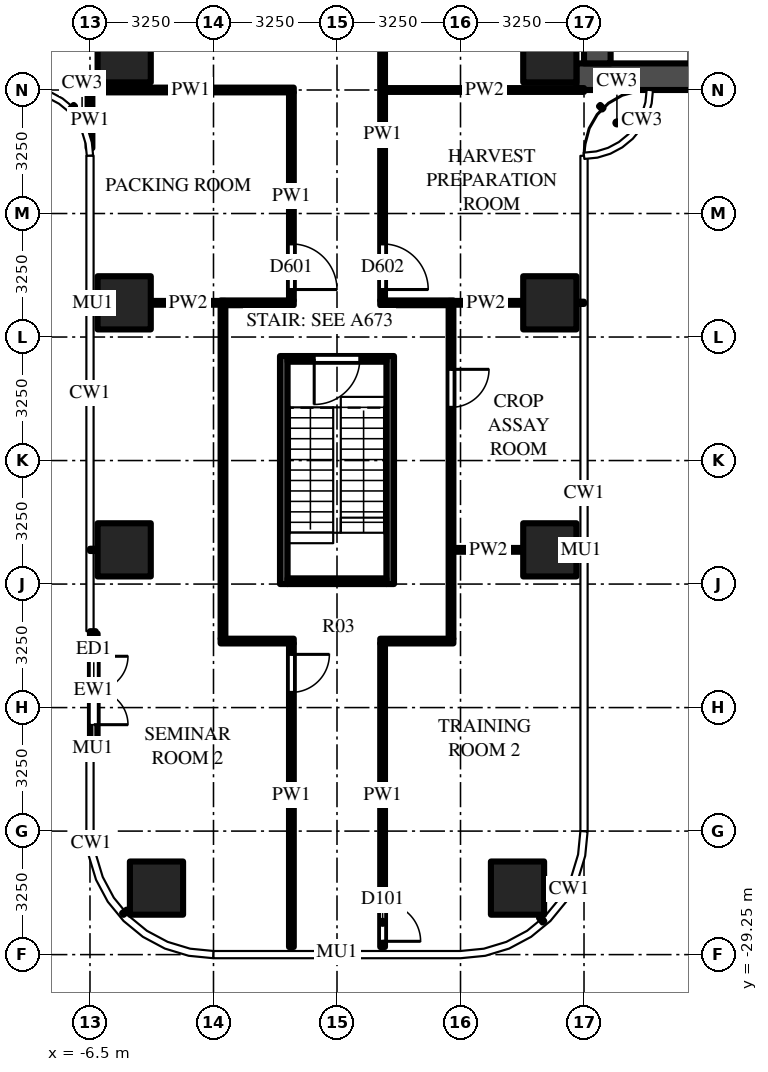
"""IFC4 building model, lengths in metres.
Left out: names, types, materials, properties, quantities, classifications, styles, units other than length and angle.
Written with IfcOpenShell. Run it as: python <this file> out.ifc"""

import sys

from ifc_helpers import new_model, si_unit, direction, frame, frame_2d, origin, origin_2d, place, context, subcontext, project, spatial, rectangle, extrude, source, transform, mapped, element, fill, save


model = new_model("IFC4")
c1 = context("Model", 3, precision=1e-05, world=origin(), true_north=direction((0.0, 1.0)))
c2 = subcontext(c1, "Body", "Model", "MODEL_VIEW")
j1 = project(units=[si_unit("LENGTHUNIT", "METRE"), si_unit("PLANEANGLEUNIT", "RADIAN")], contexts=[c1])
p1 = place(None, origin())
s1 = spatial("IfcSite", under=j1, at=p1, CompositionType="ELEMENT")
p2 = place(p1, origin())
s2 = spatial("IfcBuilding", under=s1, at=p2, CompositionType="ELEMENT")
p3 = place(p2, frame((0.0, 0.0, 61.0)))
s3 = spatial("IfcBuildingStorey", under=s2, at=p3, CompositionType="ELEMENT", Elevation=61.0)
m1 = source(origin(), c2, "Body", "SweptSolid", [
    extrude(rectangle(XDim=1.4, YDim=1.4, at=origin_2d()), origin(), (0.0, 0.0, 1.0), 4.5),
])
for number, where, z_axis, x_axis in (
    (1, (5.6, -5.6, 0.0), (0.0, 0.0, 1.0), (1.0, 0.0, 0.0)),
    (2, (-5.6, -5.6, 0.0), (0.0, 0.0, 1.0), (1.0, 0.0, 0.0)),
    (3, (5.6, -12.1, 0.0), (0.0, 0.0, 1.0), (1.0, 0.0, 0.0)),
    (4, (5.6, -18.6, 0.0), (0.0, 0.0, 1.0), (1.0, 0.0, 0.0)),
    (5, (4.75, -27.5, 0.0), (0.0, 0.0, 1.0), (1.0, 0.0, 0.0)),
    (6, (-5.6, -12.1, 0.0), (0.0, 0.0, 1.0), (1.0, 0.0, 0.0)),
    (7, (-5.6, -18.6, 0.0), (0.0, 0.0, 1.0), (1.0, 0.0, 0.0)),
    (8, (-4.75, -27.5, 0.0), (0.0, 0.0, 1.0), (1.0, 0.0, 0.0)),
):
    element("IfcColumn", number, at=place(p3, frame(where, z_axis=z_axis, x_axis=x_axis)), inside=s3, PredefinedType="COLUMN", context=c2, shape_type="MappedRepresentation", body=[
        mapped(m1, transform((0.0, 0.0, 0.0))),
    ])
m2 = source(origin(), c2, "Body", "SweptSolid", [
    extrude(rectangle(XDim=16.45, YDim=0.7, at=frame_2d((8.225, 0.0))), origin(), (0.0, 0.0, 1.0), 4.25),
])
p4 = place(p3, frame((6.3, -6.15, 0.0), z_axis=(0.0, 0.0, 1.0), x_axis=(1.0, 0.0, 0.0)))
e9 = element("IfcWall", 9, at=p4, inside=s3, PredefinedType="SHEAR", context=c2, shape_type="MappedRepresentation", body=[
    mapped(m2, transform((0.0, 0.0, 0.0))),
])
m3 = source(origin(), c2, "Body", "SweptSolid", [
    extrude(rectangle(XDim=9.05, YDim=0.7, at=frame_2d((4.525, 0.0))), origin(), (0.0, 0.0, 1.0), 4.25),
])
p5 = place(p3, frame((6.85, -5.8, 0.0), z_axis=(0.0, 0.0, 1.0), x_axis=(0.0, 1.0, 0.0)))
e10 = element("IfcWall", 10, at=p5, inside=s3, PredefinedType="SHEAR", context=c2, shape_type="MappedRepresentation", body=[
    mapped(m3, transform((0.0, 0.0, 0.0))),
])
m4 = source(origin(), c2, "Body", "SweptSolid", [
    extrude(rectangle(XDim=1.8, YDim=2.1, at=frame_2d((0.9, 1.05))), frame((0.0, 0.36, 0.0), z_axis=(0.0, -1.0, 0.0), x_axis=(1.0, 0.0, 0.0)), (0.0, 0.0, 1.0), 0.72),
])
p6 = place(p5, frame((3.15, 0.0, 0.0)))
e11 = element("IfcOpeningElement", 11, at=p6, cuts=e10, PredefinedType="OPENING", context=c2, shape_type="MappedRepresentation", body=[
    mapped(m4, transform((0.0, 0.0, 0.0))),
])
m5 = source(origin(), c2, "Body", "SweptSolid", [
    extrude(rectangle(XDim=6.0, YDim=0.2, at=frame_2d((3.0, 0.0))), origin(), (0.0, 0.0, 1.0), 4.25),
])
for number, where, z_axis, x_axis in (
    (12, (1.4, -13.5, 0.0), (0.0, 0.0, 1.0), (0.0, -1.0, 0.0)),
    (13, (-1.4, -13.5, 0.0), (0.0, 0.0, 1.0), (0.0, -1.0, 0.0)),
):
    element("IfcWall", number, at=place(p3, frame(where, z_axis=z_axis, x_axis=x_axis)), inside=s3, PredefinedType="SHEAR", context=c2, shape_type="MappedRepresentation", body=[
        mapped(m5, transform((0.0, 0.0, 0.0))),
    ])
m6 = source(origin(), c2, "Body", "SweptSolid", [
    extrude(rectangle(XDim=2.6, YDim=0.15, at=frame_2d((1.3, 0.0))), origin(), (0.0, 0.0, 1.0), 4.25),
])
p7 = place(p3, frame((1.3, -13.575, 0.0), z_axis=(0.0, 0.0, 1.0), x_axis=(-1.0, 0.0, 0.0)))
e14 = element("IfcWall", 14, at=p7, inside=s3, PredefinedType="SHEAR", context=c2, shape_type="MappedRepresentation", body=[
    mapped(m6, transform((0.0, 0.0, 0.0))),
])
m7 = source(origin(), c2, "Body", "SweptSolid", [
    extrude(rectangle(XDim=1.2, YDim=2.1, at=frame_2d((0.6, 1.05))), frame((0.0, 0.085, 0.0), z_axis=(0.0, -1.0, 0.0), x_axis=(1.0, 0.0, 0.0)), (0.0, 0.0, 1.0), 0.17),
])
p8 = place(p7, frame((0.7, 0.0, 0.0)))
e15 = element("IfcOpeningElement", 15, at=p8, cuts=e14, PredefinedType="OPENING", context=c2, shape_type="MappedRepresentation", body=[
    mapped(m7, transform((0.0, 0.0, 0.0))),
])
p9 = place(p3, frame((1.3, -19.425, 0.0), z_axis=(0.0, 0.0, 1.0), x_axis=(-1.0, 0.0, 0.0)))
e16 = element("IfcWall", 16, at=p9, inside=s3, PredefinedType="SHEAR", context=c2, shape_type="MappedRepresentation", body=[
    mapped(m6, transform((0.0, 0.0, 0.0))),
])
m8 = source(origin(), c2, "Body", "SweptSolid", [
    extrude(rectangle(XDim=3.0, YDim=0.2, at=frame_2d((1.5, 0.0))), origin(), (0.0, 0.0, 1.0), 4.25),
])
p10 = place(p3, frame((-6.4, -20.8, 0.0), z_axis=(0.0, 0.0, 1.0), x_axis=(0.0, -1.0, 0.0)))
e17 = element("IfcWall", 17, at=p10, inside=s3, PredefinedType="SOLIDWALL", context=c2, shape_type="MappedRepresentation", body=[
    mapped(m8, transform((0.0, 0.0, 0.0))),
])
m9 = source(origin(), c2, "Body", "SweptSolid", [
    extrude(rectangle(XDim=1.8, YDim=2.4, at=frame_2d((0.9, 1.2))), frame((0.0, 0.11, 0.0), z_axis=(0.0, -1.0, 0.0), x_axis=(1.0, 0.0, 0.0)), (0.0, 0.0, 1.0), 0.22),
])
p11 = place(p10, frame((0.6, 0.0, 0.0)))
e18 = element("IfcOpeningElement", 18, at=p11, cuts=e17, PredefinedType="OPENING", context=c2, shape_type="MappedRepresentation", body=[
    mapped(m9, transform((0.0, 0.0, 0.0))),
])
m10 = source(origin(), c2, "Body", "SweptSolid", [
    extrude(rectangle(XDim=1.469, YDim=0.125, at=frame_2d((0.734, 0.0))), origin(), (0.0, 0.0, 1.0), 4.25),
])
p12 = place(p3, frame((-6.5, -6.562, 0.0), z_axis=(0.0, 0.0, 1.0), x_axis=(0.0, -1.0, 0.0)))
e19 = element("IfcWall", 19, at=p12, inside=s3, PredefinedType="PARTITIONING", context=c2, shape_type="MappedRepresentation", body=[
    mapped(m10, transform((0.0, 0.0, 0.0))),
])
m11 = source(origin(), c2, "Body", "SweptSolid", [
    extrude(rectangle(XDim=8.788, YDim=0.125, at=frame_2d((4.394, 0.0))), origin(), (0.0, 0.0, 1.0), 3.468),
])
p13 = place(p3, frame((-3.0, -20.938, 0.0), z_axis=(0.0, 0.0, 1.0), x_axis=(0.0, 1.0, 0.0)))
e20 = element("IfcWall", 20, at=p13, inside=s3, PredefinedType="PARTITIONING", context=c2, shape_type="MappedRepresentation", body=[
    mapped(m11, transform((0.0, 0.0, 0.0))),
])
m12 = source(origin(), c2, "Body", "SweptSolid", [
    extrude(rectangle(XDim=7.988, YDim=0.125, at=frame_2d((3.994, 0.0))), origin(), (0.0, 0.0, 1.0), 3.33),
])
p14 = place(p3, frame((-1.2, -21.062, 0.0), z_axis=(0.0, 0.0, 1.0), x_axis=(0.0, -1.0, 0.0)))
e21 = element("IfcWall", 21, at=p14, inside=s3, PredefinedType="PARTITIONING", context=c2, shape_type="MappedRepresentation", body=[
    mapped(m12, transform((0.0, 0.0, 0.0))),
])
m13 = source(origin(), c2, "Body", "SweptSolid", [
    extrude(rectangle(XDim=1.0, YDim=2.1, at=frame_2d((0.5, 1.05))), frame((0.0, 0.073, 0.0), z_axis=(0.0, -1.0, 0.0), x_axis=(1.0, 0.0, 0.0)), (0.0, 0.0, 1.0), 0.145),
])
p15 = place(p14, frame((0.288, 0.0, 0.0)))
e22 = element("IfcOpeningElement", 22, at=p15, cuts=e21, PredefinedType="OPENING", context=c2, shape_type="MappedRepresentation", body=[
    mapped(m13, transform((0.0, 0.0, 0.0))),
])
m14 = source(origin(), c2, "Body", "SweptSolid", [
    extrude(rectangle(XDim=5.475, YDim=0.125, at=frame_2d((2.738, 0.0))), origin(), (0.0, 0.0, 1.0), 3.468),
])
p16 = place(p3, frame((-1.2, -6.562, 0.0), z_axis=(0.0, 0.0, 1.0), x_axis=(0.0, -1.0, 0.0)))
e23 = element("IfcWall", 23, at=p16, inside=s3, PredefinedType="PARTITIONING", context=c2, shape_type="MappedRepresentation", body=[
    mapped(m14, transform((0.0, 0.0, 0.0))),
])
m15 = source(origin(), c2, "Body", "SweptSolid", [
    extrude(rectangle(XDim=1.2, YDim=2.1, at=frame_2d((0.6, 1.05))), frame((0.0, 0.073, 0.0), z_axis=(0.0, -1.0, 0.0), x_axis=(1.0, 0.0, 0.0)), (0.0, 0.0, 1.0), 0.145),
])
p17 = place(p16, frame((3.988, 0.0, 0.0)))
e24 = element("IfcOpeningElement", 24, at=p17, cuts=e23, PredefinedType="OPENING", context=c2, shape_type="MappedRepresentation", body=[
    mapped(m15, transform((0.0, 0.0, 0.0))),
])
p18 = place(p3, frame((1.2, -21.062, 0.0), z_axis=(0.0, 0.0, 1.0), x_axis=(0.0, -1.0, 0.0)))
e25 = element("IfcWall", 25, at=p18, inside=s3, PredefinedType="PARTITIONING", context=c2, shape_type="MappedRepresentation", body=[
    mapped(m12, transform((0.0, 0.0, 0.0))),
])
p19 = place(p18, frame((6.837, 0.0, 0.0)))
e26 = element("IfcOpeningElement", 26, at=p19, cuts=e25, PredefinedType="OPENING", context=c2, shape_type="MappedRepresentation", body=[
    mapped(m13, transform((0.0, 0.0, 0.0))),
])
m16 = source(origin(), c2, "Body", "SweptSolid", [
    extrude(rectangle(XDim=8.725, YDim=0.125, at=frame_2d((4.363, 0.0))), origin(), (0.0, 0.0, 1.0), 3.468),
])
p20 = place(p3, frame((1.2, -3.312, 0.0), z_axis=(0.0, 0.0, 1.0), x_axis=(0.0, -1.0, 0.0)))
e27 = element("IfcWall", 27, at=p20, inside=s3, PredefinedType="PARTITIONING", context=c2, shape_type="MappedRepresentation", body=[
    mapped(m16, transform((0.0, 0.0, 0.0))),
])
p21 = place(p20, frame((7.238, 0.0, 0.0)))
e28 = element("IfcOpeningElement", 28, at=p21, cuts=e27, PredefinedType="OPENING", context=c2, shape_type="MappedRepresentation", body=[
    mapped(m15, transform((0.0, 0.0, 0.0))),
])
p22 = place(p3, frame((3.0, -12.15, 0.0), z_axis=(0.0, 0.0, 1.0), x_axis=(0.0, -1.0, 0.0)))
e29 = element("IfcWall", 29, at=p22, inside=s3, PredefinedType="PARTITIONING", context=c2, shape_type="MappedRepresentation", body=[
    mapped(m11, transform((0.0, 0.0, 0.0))),
])
p23 = place(p22, frame((1.7, 0.0, 0.0)))
e30 = element("IfcOpeningElement", 30, at=p23, cuts=e29, PredefinedType="OPENING", context=c2, shape_type="MappedRepresentation", body=[
    mapped(m13, transform((0.0, 0.0, 0.0))),
])
m17 = source(origin(), c2, "Body", "SweptSolid", [
    extrude(rectangle(XDim=1.925, YDim=0.125, at=frame_2d((0.962, 0.0))), origin(), (0.0, 0.0, 1.0), 4.25),
])
for number, where, z_axis, x_axis in (
    (31, (-1.137, -21.0, 0.0), (0.0, 0.0, 1.0), (-1.0, 0.0, 0.0)),
    (32, (3.062, -21.0, 0.0), (0.0, 0.0, 1.0), (-1.0, 0.0, 0.0)),
):
    element("IfcWall", number, at=place(p3, frame(where, z_axis=z_axis, x_axis=x_axis)), inside=s3, PredefinedType="PARTITIONING", context=c2, shape_type="MappedRepresentation", body=[
        mapped(m17, transform((0.0, 0.0, 0.0))),
    ])
m18 = source(origin(), c2, "Body", "SweptSolid", [
    extrude(rectangle(XDim=1.837, YDim=0.1, at=frame_2d((0.919, 0.0))), origin(), (0.0, 0.0, 1.0), 3.697),
])
p24 = place(p3, frame((3.062, -18.6, 0.0), z_axis=(0.0, 0.0, 1.0), x_axis=(1.0, 0.0, 0.0)))
e33 = element("IfcWall", 33, at=p24, inside=s3, PredefinedType="PARTITIONING", context=c2, shape_type="MappedRepresentation", body=[
    mapped(m18, transform((0.0, 0.0, 0.0))),
])
m19 = source(origin(), c2, "Body", "SweptSolid", [
    extrude(rectangle(XDim=1.962, YDim=0.1, at=frame_2d((0.981, 0.0))), origin(), (0.0, 0.0, 1.0), 3.468),
])
for number, where, z_axis, x_axis in (
    (34, (-4.9, -12.1, 0.0), (0.0, 0.0, 1.0), (1.0, 0.0, 0.0)),
    (35, (2.938, -12.1, 0.0), (0.0, 0.0, 1.0), (1.0, 0.0, 0.0)),
):
    element("IfcWall", number, at=place(p3, frame(where, z_axis=z_axis, x_axis=x_axis)), inside=s3, PredefinedType="PARTITIONING", context=c2, shape_type="MappedRepresentation", body=[
        mapped(m19, transform((0.0, 0.0, 0.0))),
    ])
m20 = source(origin(), c2, "Body", "SweptSolid", [
    extrude(rectangle(XDim=1.925, YDim=0.125, at=frame_2d((0.962, 0.0))), origin(), (0.0, 0.0, 1.0), 3.468),
])
for number, where, z_axis, x_axis in (
    (36, (-3.062, -12.1, 0.0), (0.0, 0.0, 1.0), (1.0, 0.0, 0.0)),
    (37, (1.137, -12.1, 0.0), (0.0, 0.0, 1.0), (1.0, 0.0, 0.0)),
):
    element("IfcWall", number, at=place(p3, frame(where, z_axis=z_axis, x_axis=x_axis)), inside=s3, PredefinedType="PARTITIONING", context=c2, shape_type="MappedRepresentation", body=[
        mapped(m20, transform((0.0, 0.0, 0.0))),
    ])
m21 = source(origin(), c2, "Body", "SweptSolid", [
    extrude(rectangle(XDim=5.238, YDim=0.1, at=frame_2d((2.619, 0.0))), origin(), (0.0, 0.0, 1.0), 3.33),
])
p25 = place(p3, frame((1.262, -6.5, 0.0), z_axis=(0.0, 0.0, 1.0), x_axis=(1.0, 0.0, 0.0)))
e38 = element("IfcWall", 38, at=p25, inside=s3, PredefinedType="PARTITIONING", context=c2, shape_type="MappedRepresentation", body=[
    mapped(m21, transform((0.0, 0.0, 0.0))),
])
m22 = source(origin(), c2, "Body", "SweptSolid", [
    extrude(rectangle(XDim=5.425, YDim=0.125, at=frame_2d((2.712, 0.0))), origin(), (0.0, 0.0, 1.0), 3.33),
])
p26 = place(p3, frame((-1.137, -6.5, 0.0), z_axis=(0.0, 0.0, 1.0), x_axis=(-1.0, 0.0, 0.0)))
e39 = element("IfcWall", 39, at=p26, inside=s3, PredefinedType="PARTITIONING", context=c2, shape_type="MappedRepresentation", body=[
    mapped(m22, transform((0.0, 0.0, 0.0))),
])
m23 = source(origin(), c2, "Body", "SweptSolid", [
    extrude(rectangle(XDim=1.2, YDim=2.1, at=frame_2d((0.6, 1.05))), frame((0.0, 0.025, 0.0), z_axis=(0.0, -1.0, 0.0), x_axis=(1.0, 0.0, 0.0)), (0.0, 0.0, 1.0), 0.05),
])
p27 = place(p8, origin())
e40 = element("IfcDoor", 40, at=p27, inside=s3, OperationType="SINGLE_SWING_RIGHT", PredefinedType="DOOR", context=c2, shape_type="MappedRepresentation", body=[
    mapped(m23, transform((0.0, 0.0, 0.0))),
])
fill(e15, e40)
m24 = source(origin(), c2, "Body", "SweptSolid", [
    extrude(rectangle(XDim=1.8, YDim=2.4, at=frame_2d((0.9, 1.2))), frame((0.0, 0.025, 0.0), z_axis=(0.0, -1.0, 0.0), x_axis=(1.0, 0.0, 0.0)), (0.0, 0.0, 1.0), 0.05),
])
p28 = place(p11, origin())
e41 = element("IfcDoor", 41, at=p28, inside=s3, OperationType="DOUBLE_DOOR_SINGLE_SWING", PredefinedType="DOOR", context=c2, shape_type="MappedRepresentation", body=[
    mapped(m24, transform((0.0, 0.0, 0.0))),
])
fill(e18, e41)
m25 = source(origin(), c2, "Body", "SweptSolid", [
    extrude(rectangle(XDim=1.0, YDim=2.1, at=frame_2d((0.5, 1.05))), frame((0.0, 0.025, 0.0), z_axis=(0.0, -1.0, 0.0), x_axis=(1.0, 0.0, 0.0)), (0.0, 0.0, 1.0), 0.05),
])
p29 = place(p19, origin())
e42 = element("IfcDoor", 42, at=p29, inside=s3, OperationType="SINGLE_SWING_RIGHT", PredefinedType="DOOR", context=c2, shape_type="MappedRepresentation", body=[
    mapped(m25, transform((0.0, 0.0, 0.0))),
])
fill(e26, e42)
p30 = place(p15, origin())
e43 = element("IfcDoor", 43, at=p30, inside=s3, OperationType="SINGLE_SWING_LEFT", PredefinedType="DOOR", context=c2, shape_type="MappedRepresentation", body=[
    mapped(m25, transform((0.0, 0.0, 0.0))),
])
fill(e22, e43)
p31 = place(p23, origin())
e44 = element("IfcDoor", 44, at=p31, inside=s3, OperationType="SINGLE_SWING_LEFT", PredefinedType="DOOR", context=c2, shape_type="MappedRepresentation", body=[
    mapped(m25, transform((0.0, 0.0, 0.0))),
])
fill(e30, e44)
p32 = place(p17, origin())
e45 = element("IfcDoor", 45, at=p32, inside=s3, OperationType="SINGLE_SWING_RIGHT", PredefinedType="DOOR", context=c2, shape_type="MappedRepresentation", body=[
    mapped(m23, transform((0.0, 0.0, 0.0))),
])
fill(e24, e45)
p33 = place(p21, origin())
e46 = element("IfcDoor", 46, at=p33, inside=s3, OperationType="SINGLE_SWING_RIGHT", PredefinedType="DOOR", context=c2, shape_type="MappedRepresentation", body=[
    mapped(m23, transform((0.0, 0.0, 0.0))),
])
fill(e28, e46)
save(model, sys.argv[1])
